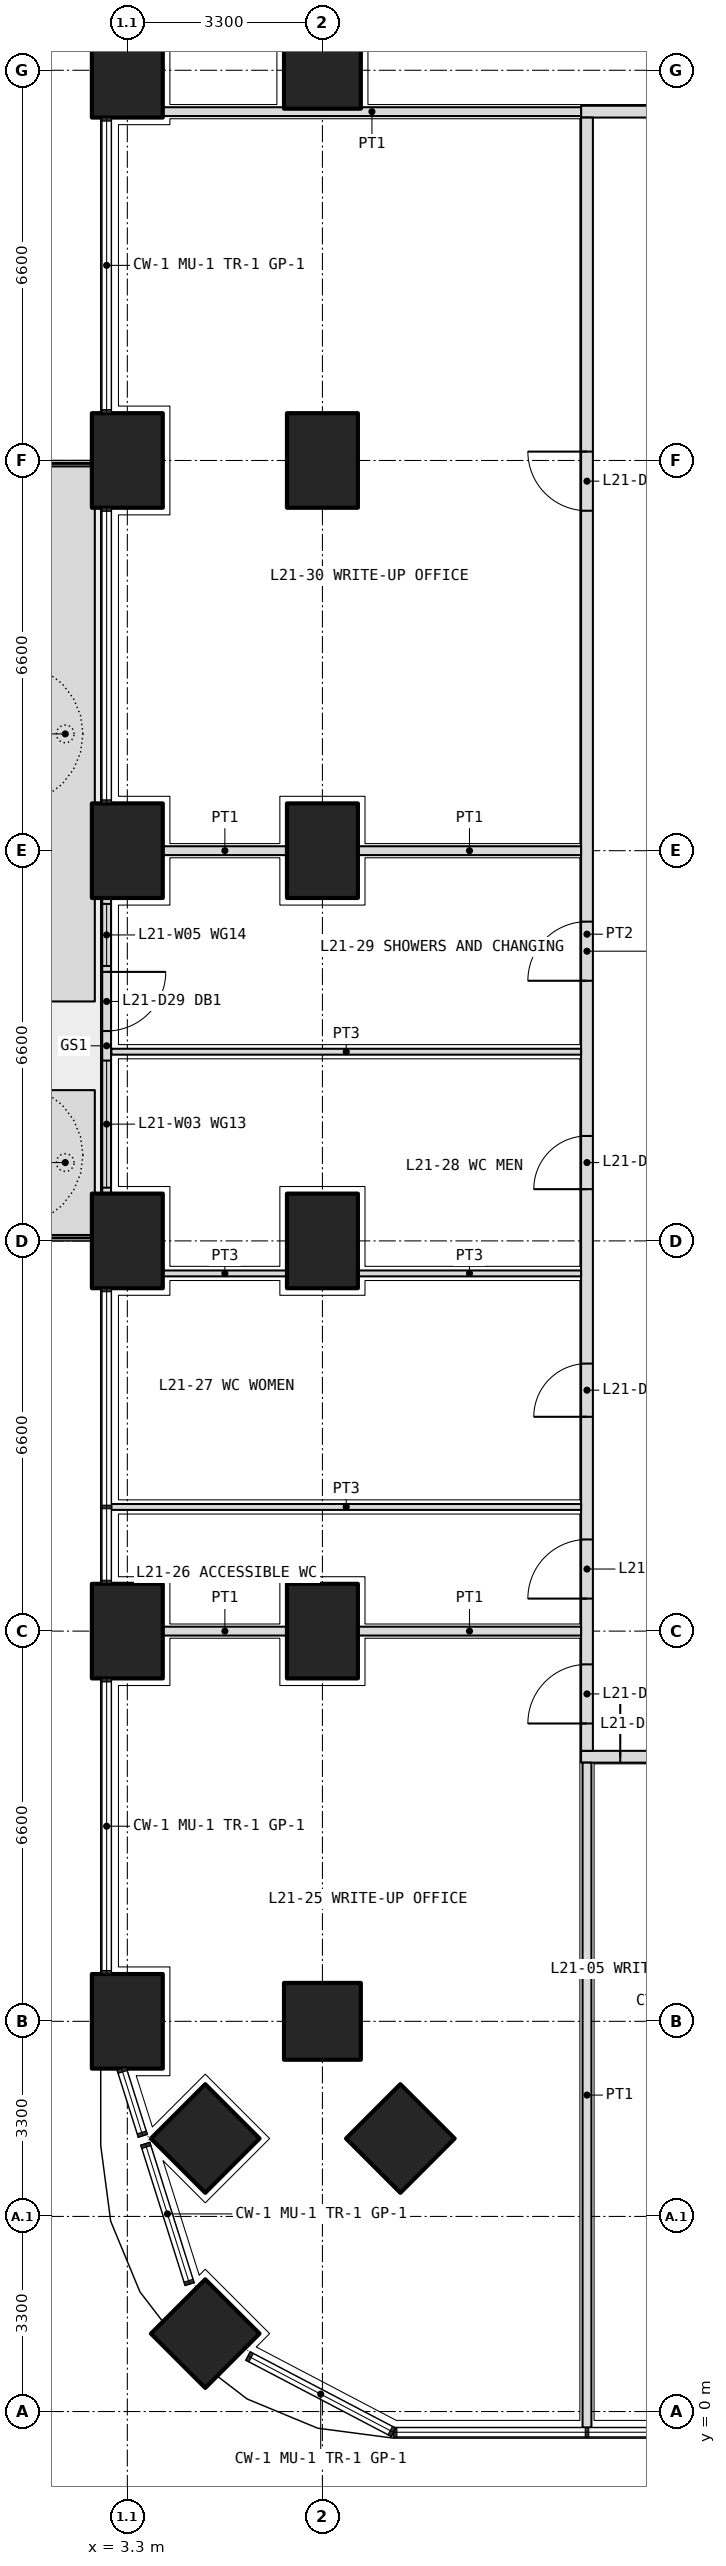
"""IFC4 building model, lengths in metres.
Left out: names, types, materials, properties, quantities, classifications, styles, units other than length and angle.
Written with IfcOpenShell. Run it as: python <this file> out.ifc"""

import sys

from ifc_helpers import new_model, si_unit, direction, frame, frame_2d, origin, origin_2d, place, context, subcontext, project, spatial, polyline, rectangle, outline, extrude, element, fill, save


model = new_model("IFC4")
c1 = context("Model", 3, precision=1e-05, world=origin(), true_north=direction((0.0, 1.0)))
c2 = subcontext(c1, "Body", "Model", "MODEL_VIEW")
j1 = project(units=[si_unit("LENGTHUNIT", "METRE"), si_unit("PLANEANGLEUNIT", "RADIAN")], contexts=[c1])
p1 = place(None, origin())
s1 = spatial("IfcSite", under=j1, at=p1, CompositionType="ELEMENT")
p2 = place(p1, origin())
s2 = spatial("IfcBuilding", under=s1, at=p2, CompositionType="ELEMENT")
p3 = place(p2, frame((0.0, 0.0, 94.8)))
s3 = spatial("IfcBuildingStorey", under=s2, at=p3, CompositionType="ELEMENT", Elevation=94.8)
p4 = place(p3, frame((4.618, 1.318, 0.0), z_axis=(0.0, 0.0, 1.0), x_axis=(0.707106781187, 0.707106781187, 0.0)))
e1 = element("IfcColumn", 1, at=p4, inside=s3, PredefinedType="COLUMN", context=c2, shape_type="SweptSolid", body=[
    extrude(rectangle(XDim=1.3, YDim=1.3, at=origin_2d()), origin(), (0.0, 0.0, 1.0), 4.2),
])
for number, where, z_axis, x_axis in (
    (2, (3.3, 6.6, 0.0), (0.0, 0.0, 1.0), (0.0, 1.0, 0.0)),
    (3, (3.3, 13.2, 0.0), (0.0, 0.0, 1.0), (0.0, 1.0, 0.0)),
    (4, (3.3, 19.8, 0.0), (0.0, 0.0, 1.0), (0.0, 1.0, 0.0)),
    (5, (3.3, 26.4, 0.0), (0.0, 0.0, 1.0), (0.0, 1.0, 0.0)),
    (6, (3.3, 33.0, 0.0), (0.0, 0.0, 1.0), (0.0, 1.0, 0.0)),
    (7, (3.3, 39.6, 0.0), (0.0, 0.0, 1.0), (0.0, 1.0, 0.0)),
):
    element("IfcColumn", number, at=place(p3, frame(where, z_axis=z_axis, x_axis=x_axis)), inside=s3, PredefinedType="COLUMN", context=c2, shape_type="SweptSolid", body=[
        extrude(rectangle(XDim=1.6, YDim=1.2, at=origin_2d()), origin(), (0.0, 0.0, 1.0), 4.2),
    ])
for number, where, z_axis, x_axis in (
    (8, (6.6, 6.6, 0.0), (0.0, 0.0, 1.0), (1.0, 0.0, 0.0)),
    (9, (6.6, 39.6, 0.0), (0.0, 0.0, 1.0), (1.0, 0.0, 0.0)),
    (10, (4.618, 4.618, 0.0), (0.0, 0.0, 1.0), (0.707, 0.707, 0.0)),
    (11, (7.918, 4.618, 0.0), (0.0, 0.0, 1.0), (0.707, 0.707, 0.0)),
):
    element("IfcColumn", number, at=place(p3, frame(where, z_axis=z_axis, x_axis=x_axis)), inside=s3, PredefinedType="COLUMN", context=c2, shape_type="SweptSolid", body=[
        extrude(rectangle(XDim=1.3, YDim=1.3, at=origin_2d()), origin(), (0.0, 0.0, 1.0), 4.2),
    ])
for number, where, z_axis, x_axis in (
    (12, (6.6, 13.2, 0.0), (0.0, 0.0, 1.0), (0.0, 1.0, 0.0)),
    (13, (6.6, 19.8, 0.0), (0.0, 0.0, 1.0), (0.0, 1.0, 0.0)),
    (14, (6.6, 26.4, 0.0), (0.0, 0.0, 1.0), (0.0, 1.0, 0.0)),
    (15, (6.6, 33.0, 0.0), (0.0, 0.0, 1.0), (0.0, 1.0, 0.0)),
):
    element("IfcColumn", number, at=place(p3, frame(where, z_axis=z_axis, x_axis=x_axis)), inside=s3, PredefinedType="COLUMN", context=c2, shape_type="SweptSolid", body=[
        extrude(rectangle(XDim=1.6, YDim=1.2, at=origin_2d()), origin(), (0.0, 0.0, 1.0), 4.2),
    ])
p5 = place(p3, origin())
e16 = element("IfcWall", 16, at=p5, inside=s3, PredefinedType="USERDEFINED", context=c2, shape_type="SweptSolid", body=[
    extrude(outline(polyline([(1.75, 19.9), (2.75, 19.9), (2.75, 22.35), (1.75, 22.35), (1.75, 19.9)]), holes=[polyline([(1.9, 20.05), (2.6, 20.05), (2.6, 22.2), (1.9, 22.2), (1.9, 20.05)])]), origin(), (0.0, 0.0, 1.0), 1.05),
])
p6 = place(p3, origin())
e17 = element("IfcWall", 17, at=p6, inside=s3, PredefinedType="USERDEFINED", context=c2, shape_type="SweptSolid", body=[
    extrude(outline(polyline([(1.75, 23.85), (2.75, 23.85), (2.75, 32.9), (1.75, 32.9), (1.75, 23.85)]), holes=[polyline([(1.9, 24.0), (2.6, 24.0), (2.6, 32.75), (1.9, 32.75), (1.9, 24.0)])]), origin(), (0.0, 0.0, 1.0), 1.05),
])
p7 = place(p3, frame((2.95, 25.6, 0.0), z_axis=(0.0, 0.0, 1.0), x_axis=(0.0, -1.0, 0.0)))
e18 = element("IfcWall", 18, at=p7, inside=s3, PredefinedType="SOLIDWALL", context=c2, shape_type="SweptSolid", body=[
    extrude(rectangle(XDim=5.0, YDim=0.15, at=frame_2d((2.5, 0.0))), origin(), (0.0, 0.0, 1.0), 2.7),
])
p8 = place(p7, frame((1.25, 0.0, 0.0)))
e19 = element("IfcOpeningElement", 19, at=p8, cuts=e18, PredefinedType="OPENING", context=c2, shape_type="SweptSolid", body=[
    extrude(rectangle(XDim=1.0, YDim=2.4, at=frame_2d((0.5, 1.2))), frame((0.0, 0.085, 0.0), z_axis=(0.0, -1.0, 0.0), x_axis=(1.0, 0.0, 0.0)), (0.0, 0.0, 1.0), 0.17),
])
p9 = place(p7, frame((0.1, 0.0, 0.1)))
e20 = element("IfcOpeningElement", 20, at=p9, cuts=e18, PredefinedType="OPENING", context=c2, shape_type="SweptSolid", body=[
    extrude(rectangle(XDim=1.05, YDim=2.3, at=frame_2d((0.525, 1.15))), frame((0.0, 0.085, 0.0), z_axis=(0.0, -1.0, 0.0), x_axis=(1.0, 0.0, 0.0)), (0.0, 0.0, 1.0), 0.17),
])
p10 = place(p7, frame((2.75, 0.0, 0.1)))
e21 = element("IfcOpeningElement", 21, at=p10, cuts=e18, PredefinedType="OPENING", context=c2, shape_type="SweptSolid", body=[
    extrude(rectangle(XDim=2.15, YDim=2.3, at=frame_2d((1.075, 1.15))), frame((0.0, 0.085, 0.0), z_axis=(0.0, -1.0, 0.0), x_axis=(1.0, 0.0, 0.0)), (0.0, 0.0, 1.0), 0.17),
])
p11 = place(p3, frame((10.975, 11.075, 0.0), z_axis=(0.0, 0.0, 1.0), x_axis=(1.0, 0.0, 0.0)))
e22 = element("IfcWall", 22, at=p11, inside=s3, PredefinedType="PARTITIONING", context=c2, shape_type="SweptSolid", body=[
    extrude(rectangle(XDim=30.85, YDim=0.2, at=frame_2d((15.425, 0.0))), origin(), (0.0, 0.0, 1.0), 2.85),
])
p12 = place(p11, frame((0.663, 0.0, 0.0)))
e23 = element("IfcOpeningElement", 23, at=p12, cuts=e22, PredefinedType="OPENING", context=c2, shape_type="SweptSolid", body=[
    extrude(rectangle(XDim=1.0, YDim=2.1, at=frame_2d((0.5, 1.05))), frame((0.0, 0.11, 0.0), z_axis=(0.0, -1.0, 0.0), x_axis=(1.0, 0.0, 0.0)), (0.0, 0.0, 1.0), 0.22),
])
p13 = place(p11, frame((3.275, 0.0, 0.0)))
e24 = element("IfcOpeningElement", 24, at=p13, cuts=e22, PredefinedType="OPENING", context=c2, shape_type="SweptSolid", body=[
    extrude(rectangle(XDim=1.2, YDim=2.1, at=frame_2d((0.6, 1.05))), frame((0.0, 0.11, 0.0), z_axis=(0.0, -1.0, 0.0), x_axis=(1.0, 0.0, 0.0)), (0.0, 0.0, 1.0), 0.22),
])
p14 = place(p11, frame((8.325, 0.0, 0.0)))
e25 = element("IfcOpeningElement", 25, at=p14, cuts=e22, PredefinedType="OPENING", context=c2, shape_type="SweptSolid", body=[
    extrude(rectangle(XDim=1.0, YDim=2.1, at=frame_2d((0.5, 1.05))), frame((0.0, 0.11, 0.0), z_axis=(0.0, -1.0, 0.0), x_axis=(1.0, 0.0, 0.0)), (0.0, 0.0, 1.0), 0.22),
])
p15 = place(p11, frame((13.275, 0.0, 0.0)))
e26 = element("IfcOpeningElement", 26, at=p15, cuts=e22, PredefinedType="OPENING", context=c2, shape_type="SweptSolid", body=[
    extrude(rectangle(XDim=1.0, YDim=2.1, at=frame_2d((0.5, 1.05))), frame((0.0, 0.11, 0.0), z_axis=(0.0, -1.0, 0.0), x_axis=(1.0, 0.0, 0.0)), (0.0, 0.0, 1.0), 0.22),
])
p16 = place(p11, frame((16.625, 0.0, 0.0)))
e27 = element("IfcOpeningElement", 27, at=p16, cuts=e22, PredefinedType="OPENING", context=c2, shape_type="SweptSolid", body=[
    extrude(rectangle(XDim=1.0, YDim=2.1, at=frame_2d((0.5, 1.05))), frame((0.0, 0.11, 0.0), z_axis=(0.0, -1.0, 0.0), x_axis=(1.0, 0.0, 0.0)), (0.0, 0.0, 1.0), 0.22),
])
p17 = place(p11, frame((19.925, 0.0, 0.0)))
e28 = element("IfcOpeningElement", 28, at=p17, cuts=e22, PredefinedType="OPENING", context=c2, shape_type="SweptSolid", body=[
    extrude(rectangle(XDim=1.0, YDim=2.1, at=frame_2d((0.5, 1.05))), frame((0.0, 0.11, 0.0), z_axis=(0.0, -1.0, 0.0), x_axis=(1.0, 0.0, 0.0)), (0.0, 0.0, 1.0), 0.22),
])
p18 = place(p11, frame((25.887, 0.0, 0.0)))
e29 = element("IfcOpeningElement", 29, at=p18, cuts=e22, PredefinedType="OPENING", context=c2, shape_type="SweptSolid", body=[
    extrude(rectangle(XDim=1.0, YDim=2.1, at=frame_2d((0.5, 1.05))), frame((0.0, 0.11, 0.0), z_axis=(0.0, -1.0, 0.0), x_axis=(1.0, 0.0, 0.0)), (0.0, 0.0, 1.0), 0.22),
])
p19 = place(p3, frame((10.975, 38.9, 0.0), z_axis=(0.0, 0.0, 1.0), x_axis=(1.0, 0.0, 0.0)))
e30 = element("IfcWall", 30, at=p19, inside=s3, PredefinedType="PARTITIONING", context=c2, shape_type="SweptSolid", body=[
    extrude(rectangle(XDim=30.85, YDim=0.2, at=frame_2d((15.425, 0.0))), origin(), (0.0, 0.0, 1.0), 2.85),
])
p20 = place(p19, frame((5.613, 0.0, 0.0)))
e31 = element("IfcOpeningElement", 31, at=p20, cuts=e30, PredefinedType="OPENING", context=c2, shape_type="SweptSolid", body=[
    extrude(rectangle(XDim=1.0, YDim=2.1, at=frame_2d((0.5, 1.05))), frame((0.0, 0.11, 0.0), z_axis=(0.0, -1.0, 0.0), x_axis=(1.0, 0.0, 0.0)), (0.0, 0.0, 1.0), 0.22),
])
p21 = place(p19, frame((16.575, 0.0, 0.0)))
e32 = element("IfcOpeningElement", 32, at=p21, cuts=e30, PredefinedType="OPENING", context=c2, shape_type="SweptSolid", body=[
    extrude(rectangle(XDim=1.0, YDim=2.1, at=frame_2d((0.5, 1.05))), frame((0.0, 0.11, 0.0), z_axis=(0.0, -1.0, 0.0), x_axis=(1.0, 0.0, 0.0)), (0.0, 0.0, 1.0), 0.22),
])
p22 = place(p19, frame((23.175, 0.0, 0.0)))
e33 = element("IfcOpeningElement", 33, at=p22, cuts=e30, PredefinedType="OPENING", context=c2, shape_type="SweptSolid", body=[
    extrude(rectangle(XDim=1.0, YDim=2.1, at=frame_2d((0.5, 1.05))), frame((0.0, 0.11, 0.0), z_axis=(0.0, -1.0, 0.0), x_axis=(1.0, 0.0, 0.0)), (0.0, 0.0, 1.0), 0.22),
])
p23 = place(p19, frame((27.538, 0.0, 0.0)))
e34 = element("IfcOpeningElement", 34, at=p23, cuts=e30, PredefinedType="OPENING", context=c2, shape_type="SweptSolid", body=[
    extrude(rectangle(XDim=1.0, YDim=2.1, at=frame_2d((0.5, 1.05))), frame((0.0, 0.11, 0.0), z_axis=(0.0, -1.0, 0.0), x_axis=(1.0, 0.0, 0.0)), (0.0, 0.0, 1.0), 0.22),
])
p24 = place(p3, frame((11.075, 11.175, 0.0), z_axis=(0.0, 0.0, 1.0), x_axis=(0.0, 1.0, 0.0)))
e35 = element("IfcWall", 35, at=p24, inside=s3, PredefinedType="PARTITIONING", context=c2, shape_type="SweptSolid", body=[
    extrude(rectangle(XDim=27.625, YDim=0.2, at=frame_2d((13.812, 0.0))), origin(), (0.0, 0.0, 1.0), 2.85),
])
p25 = place(p24, frame((0.462, 0.0, 0.0)))
e36 = element("IfcOpeningElement", 36, at=p25, cuts=e35, PredefinedType="OPENING", context=c2, shape_type="SweptSolid", body=[
    extrude(rectangle(XDim=1.0, YDim=2.1, at=frame_2d((0.5, 1.05))), frame((0.0, 0.11, 0.0), z_axis=(0.0, -1.0, 0.0), x_axis=(1.0, 0.0, 0.0)), (0.0, 0.0, 1.0), 0.22),
])
p26 = place(p24, frame((2.575, 0.0, 0.0)))
e37 = element("IfcOpeningElement", 37, at=p26, cuts=e35, PredefinedType="OPENING", context=c2, shape_type="SweptSolid", body=[
    extrude(rectangle(XDim=1.0, YDim=2.1, at=frame_2d((0.5, 1.05))), frame((0.0, 0.11, 0.0), z_axis=(0.0, -1.0, 0.0), x_axis=(1.0, 0.0, 0.0)), (0.0, 0.0, 1.0), 0.22),
])
p27 = place(p24, frame((5.65, 0.0, 0.0)))
e38 = element("IfcOpeningElement", 38, at=p27, cuts=e35, PredefinedType="OPENING", context=c2, shape_type="SweptSolid", body=[
    extrude(rectangle(XDim=0.9, YDim=2.1, at=frame_2d((0.45, 1.05))), frame((0.0, 0.11, 0.0), z_axis=(0.0, -1.0, 0.0), x_axis=(1.0, 0.0, 0.0)), (0.0, 0.0, 1.0), 0.22),
])
p28 = place(p24, frame((9.5, 0.0, 0.0)))
e39 = element("IfcOpeningElement", 39, at=p28, cuts=e35, PredefinedType="OPENING", context=c2, shape_type="SweptSolid", body=[
    extrude(rectangle(XDim=0.9, YDim=2.1, at=frame_2d((0.45, 1.05))), frame((0.0, 0.11, 0.0), z_axis=(0.0, -1.0, 0.0), x_axis=(1.0, 0.0, 0.0)), (0.0, 0.0, 1.0), 0.22),
])
p29 = place(p24, frame((13.025, 0.0, 0.0)))
e40 = element("IfcOpeningElement", 40, at=p29, cuts=e35, PredefinedType="OPENING", context=c2, shape_type="SweptSolid", body=[
    extrude(rectangle(XDim=1.0, YDim=2.1, at=frame_2d((0.5, 1.05))), frame((0.0, 0.11, 0.0), z_axis=(0.0, -1.0, 0.0), x_axis=(1.0, 0.0, 0.0)), (0.0, 0.0, 1.0), 0.22),
])
p30 = place(p24, frame((20.975, 0.0, 0.0)))
e41 = element("IfcOpeningElement", 41, at=p30, cuts=e35, PredefinedType="OPENING", context=c2, shape_type="SweptSolid", body=[
    extrude(rectangle(XDim=1.0, YDim=2.1, at=frame_2d((0.5, 1.05))), frame((0.0, 0.11, 0.0), z_axis=(0.0, -1.0, 0.0), x_axis=(1.0, 0.0, 0.0)), (0.0, 0.0, 1.0), 0.22),
])
p31 = place(p3, frame((11.075, -0.27, 0.0), z_axis=(0.0, 0.0, 1.0), x_axis=(0.0, 1.0, 0.0)))
e42 = element("IfcWall", 42, at=p31, inside=s3, PredefinedType="PARTITIONING", context=c2, shape_type="SweptSolid", body=[
    extrude(rectangle(XDim=11.245, YDim=0.15, at=frame_2d((5.623, 0.0))), origin(), (0.0, 0.0, 1.0), 2.7),
])
p32 = place(p3, frame((3.9, 38.9, 0.0), z_axis=(0.0, 0.0, 1.0), x_axis=(1.0, 0.0, 0.0)))
e43 = element("IfcWall", 43, at=p32, inside=s3, PredefinedType="PARTITIONING", context=c2, shape_type="SweptSolid", body=[
    extrude(rectangle(XDim=7.075, YDim=0.15, at=frame_2d((3.538, 0.0))), origin(), (0.0, 0.0, 1.0), 2.85),
])
p33 = place(p3, frame((3.03, 15.3, 0.0), z_axis=(0.0, 0.0, 1.0), x_axis=(1.0, 0.0, 0.0)))
e44 = element("IfcWall", 44, at=p33, inside=s3, PredefinedType="PARTITIONING", context=c2, shape_type="SweptSolid", body=[
    extrude(rectangle(XDim=7.945, YDim=0.1, at=frame_2d((3.973, 0.0))), origin(), (0.0, 0.0, 1.0), 2.7),
])
p34 = place(p3, frame((3.9, 19.25, 0.0), z_axis=(0.0, 0.0, 1.0), x_axis=(1.0, 0.0, 0.0)))
e45 = element("IfcWall", 45, at=p34, inside=s3, PredefinedType="PARTITIONING", context=c2, shape_type="SweptSolid", body=[
    extrude(rectangle(XDim=2.1, YDim=0.1, at=frame_2d((1.05, 0.0))), origin(), (0.0, 0.0, 1.0), 2.85),
])
p35 = place(p3, frame((7.2, 19.25, 0.0), z_axis=(0.0, 0.0, 1.0), x_axis=(1.0, 0.0, 0.0)))
e46 = element("IfcWall", 46, at=p35, inside=s3, PredefinedType="PARTITIONING", context=c2, shape_type="SweptSolid", body=[
    extrude(rectangle(XDim=3.775, YDim=0.1, at=frame_2d((1.888, 0.0))), origin(), (0.0, 0.0, 1.0), 2.85),
])
p36 = place(p3, frame((3.03, 23.0, 0.0), z_axis=(0.0, 0.0, 1.0), x_axis=(1.0, 0.0, 0.0)))
e47 = element("IfcWall", 47, at=p36, inside=s3, PredefinedType="PARTITIONING", context=c2, shape_type="SweptSolid", body=[
    extrude(rectangle(XDim=7.945, YDim=0.1, at=frame_2d((3.973, 0.0))), origin(), (0.0, 0.0, 1.0), 2.7),
])
p37 = place(p3, frame((3.9, 13.2, 0.0), z_axis=(0.0, 0.0, 1.0), x_axis=(1.0, 0.0, 0.0)))
e48 = element("IfcWall", 48, at=p37, inside=s3, PredefinedType="PARTITIONING", context=c2, shape_type="SweptSolid", body=[
    extrude(rectangle(XDim=2.1, YDim=0.15, at=frame_2d((1.05, 0.0))), origin(), (0.0, 0.0, 1.0), 2.85),
])
p38 = place(p3, frame((7.2, 13.2, 0.0), z_axis=(0.0, 0.0, 1.0), x_axis=(1.0, 0.0, 0.0)))
e49 = element("IfcWall", 49, at=p38, inside=s3, PredefinedType="PARTITIONING", context=c2, shape_type="SweptSolid", body=[
    extrude(rectangle(XDim=3.775, YDim=0.15, at=frame_2d((1.888, 0.0))), origin(), (0.0, 0.0, 1.0), 2.85),
])
p39 = place(p3, frame((3.9, 26.4, 0.0), z_axis=(0.0, 0.0, 1.0), x_axis=(1.0, 0.0, 0.0)))
e50 = element("IfcWall", 50, at=p39, inside=s3, PredefinedType="PARTITIONING", context=c2, shape_type="SweptSolid", body=[
    extrude(rectangle(XDim=2.1, YDim=0.15, at=frame_2d((1.05, 0.0))), origin(), (0.0, 0.0, 1.0), 2.85),
])
p40 = place(p3, frame((7.2, 26.4, 0.0), z_axis=(0.0, 0.0, 1.0), x_axis=(1.0, 0.0, 0.0)))
e51 = element("IfcWall", 51, at=p40, inside=s3, PredefinedType="PARTITIONING", context=c2, shape_type="SweptSolid", body=[
    extrude(rectangle(XDim=3.775, YDim=0.15, at=frame_2d((1.888, 0.0))), origin(), (0.0, 0.0, 1.0), 2.85),
])
p41 = place(p8, origin())
e52 = element("IfcDoor", 52, at=p41, inside=s3, OperationType="SINGLE_SWING_LEFT", PredefinedType="DOOR", context=c2, shape_type="SweptSolid", body=[
    extrude(rectangle(XDim=1.0, YDim=2.4, at=frame_2d((0.5, 1.2))), frame((0.0, 0.025, 0.0), z_axis=(0.0, -1.0, 0.0), x_axis=(1.0, 0.0, 0.0)), (0.0, 0.0, 1.0), 0.05),
])
fill(e19, e52)
p42 = place(p9, origin())
e53 = element("IfcWindow", 53, at=p42, inside=s3, PartitioningType="SINGLE_PANEL", PredefinedType="WINDOW", context=c2, shape_type="SweptSolid", body=[
    extrude(rectangle(XDim=1.05, YDim=2.3, at=frame_2d((0.525, 1.15))), frame((0.0, 0.03, 0.0), z_axis=(0.0, -1.0, 0.0), x_axis=(1.0, 0.0, 0.0)), (0.0, 0.0, 1.0), 0.06),
])
fill(e20, e53)
p43 = place(p10, origin())
e54 = element("IfcWindow", 54, at=p43, inside=s3, PartitioningType="SINGLE_PANEL", PredefinedType="WINDOW", context=c2, shape_type="SweptSolid", body=[
    extrude(rectangle(XDim=2.15, YDim=2.3, at=frame_2d((1.075, 1.15))), frame((0.0, 0.03, 0.0), z_axis=(0.0, -1.0, 0.0), x_axis=(1.0, 0.0, 0.0)), (0.0, 0.0, 1.0), 0.06),
])
fill(e21, e54)
p44 = place(p12, origin())
e55 = element("IfcDoor", 55, at=p44, inside=s3, OperationType="SINGLE_SWING_LEFT", PredefinedType="DOOR", context=c2, shape_type="SweptSolid", body=[
    extrude(rectangle(XDim=1.0, YDim=2.1, at=frame_2d((0.5, 1.05))), frame((0.0, 0.025, 0.0), z_axis=(0.0, -1.0, 0.0), x_axis=(1.0, 0.0, 0.0)), (0.0, 0.0, 1.0), 0.05),
])
fill(e23, e55)
p45 = place(p25, origin())
e56 = element("IfcDoor", 56, at=p45, inside=s3, OperationType="SINGLE_SWING_LEFT", PredefinedType="DOOR", context=c2, shape_type="SweptSolid", body=[
    extrude(rectangle(XDim=1.0, YDim=2.1, at=frame_2d((0.5, 1.05))), frame((0.0, 0.025, 0.0), z_axis=(0.0, -1.0, 0.0), x_axis=(1.0, 0.0, 0.0)), (0.0, 0.0, 1.0), 0.05),
])
fill(e36, e56)
p46 = place(p26, origin())
e57 = element("IfcDoor", 57, at=p46, inside=s3, OperationType="SINGLE_SWING_LEFT", PredefinedType="DOOR", context=c2, shape_type="SweptSolid", body=[
    extrude(rectangle(XDim=1.0, YDim=2.1, at=frame_2d((0.5, 1.05))), frame((0.0, 0.025, 0.0), z_axis=(0.0, -1.0, 0.0), x_axis=(1.0, 0.0, 0.0)), (0.0, 0.0, 1.0), 0.05),
])
fill(e37, e57)
p47 = place(p27, origin())
e58 = element("IfcDoor", 58, at=p47, inside=s3, OperationType="SINGLE_SWING_LEFT", PredefinedType="DOOR", context=c2, shape_type="SweptSolid", body=[
    extrude(rectangle(XDim=0.9, YDim=2.1, at=frame_2d((0.45, 1.05))), frame((0.0, 0.025, 0.0), z_axis=(0.0, -1.0, 0.0), x_axis=(1.0, 0.0, 0.0)), (0.0, 0.0, 1.0), 0.05),
])
fill(e38, e58)
p48 = place(p28, origin())
e59 = element("IfcDoor", 59, at=p48, inside=s3, OperationType="SINGLE_SWING_LEFT", PredefinedType="DOOR", context=c2, shape_type="SweptSolid", body=[
    extrude(rectangle(XDim=0.9, YDim=2.1, at=frame_2d((0.45, 1.05))), frame((0.0, 0.025, 0.0), z_axis=(0.0, -1.0, 0.0), x_axis=(1.0, 0.0, 0.0)), (0.0, 0.0, 1.0), 0.05),
])
fill(e39, e59)
p49 = place(p29, origin())
e60 = element("IfcDoor", 60, at=p49, inside=s3, OperationType="SINGLE_SWING_LEFT", PredefinedType="DOOR", context=c2, shape_type="SweptSolid", body=[
    extrude(rectangle(XDim=1.0, YDim=2.1, at=frame_2d((0.5, 1.05))), frame((0.0, 0.025, 0.0), z_axis=(0.0, -1.0, 0.0), x_axis=(1.0, 0.0, 0.0)), (0.0, 0.0, 1.0), 0.05),
])
fill(e40, e60)
p50 = place(p30, origin())
e61 = element("IfcDoor", 61, at=p50, inside=s3, OperationType="SINGLE_SWING_RIGHT", PredefinedType="DOOR", context=c2, shape_type="SweptSolid", body=[
    extrude(rectangle(XDim=1.0, YDim=2.1, at=frame_2d((0.5, 1.05))), frame((0.0, 0.025, 0.0), z_axis=(0.0, -1.0, 0.0), x_axis=(1.0, 0.0, 0.0)), (0.0, 0.0, 1.0), 0.05),
])
fill(e41, e61)
save(model, sys.argv[1])
